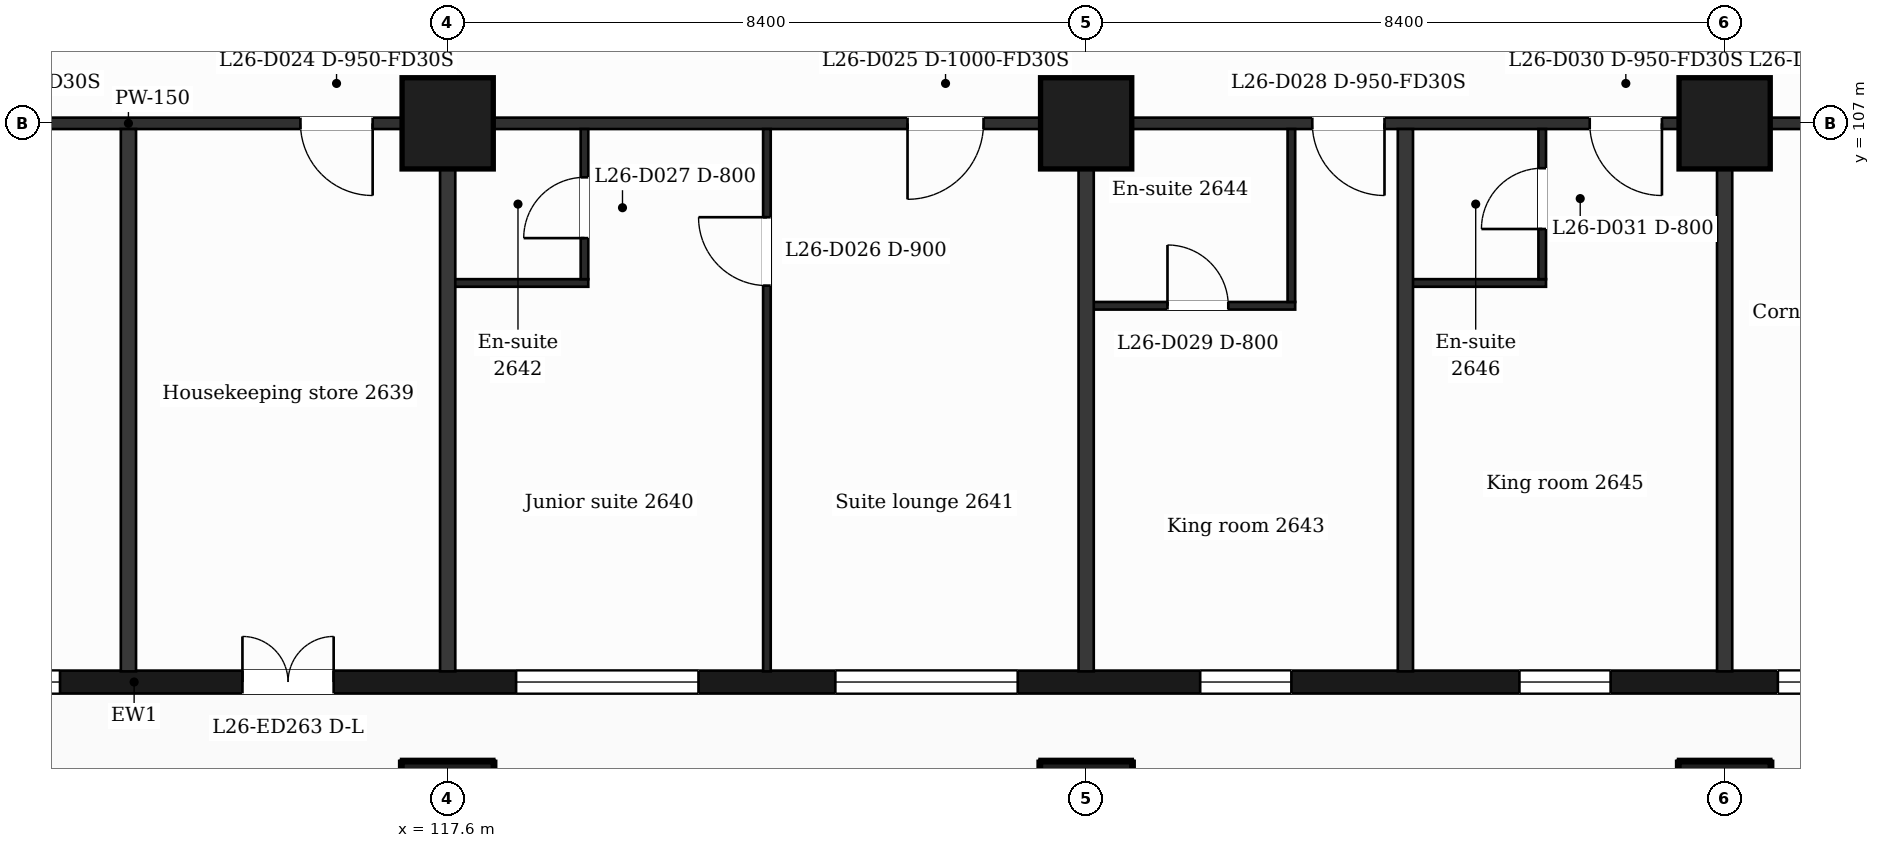
"""IFC4 building model, lengths in metres.
Left out: names, types, materials, properties, quantities, classifications, styles, units other than length and angle.
Written with IfcOpenShell. Run it as: python <this file> out.ifc"""

import sys

from ifc_helpers import new_model, si_unit, direction, frame, frame_2d, origin, origin_2d, place, context, subcontext, project, spatial, rectangle, extrude, element, fill, save


model = new_model("IFC4")
c1 = context("Model", 3, precision=1e-05, world=origin(), true_north=direction((0.0, 1.0)))
c2 = subcontext(c1, "Body", "Model", "MODEL_VIEW")
j1 = project(units=[si_unit("LENGTHUNIT", "METRE"), si_unit("PLANEANGLEUNIT", "RADIAN")], contexts=[c1])
p1 = place(None, origin())
s1 = spatial("IfcSite", under=j1, at=p1, CompositionType="ELEMENT")
p2 = place(p1, origin())
s2 = spatial("IfcBuilding", under=s1, at=p2, CompositionType="ELEMENT")
p3 = place(p2, frame((0.0, 0.0, 113.2)))
s3 = spatial("IfcBuildingStorey", under=s2, at=p3, CompositionType="ELEMENT", Elevation=113.2)
for number, where, z_axis, x_axis in (
    (1, (117.6, 98.0, 0.0), (0.0, 0.0, 1.0), (1.0, 0.0, 0.0)),
    (2, (126.0, 98.0, 0.0), (0.0, 0.0, 1.0), (1.0, 0.0, 0.0)),
    (3, (134.4, 98.0, 0.0), (0.0, 0.0, 1.0), (1.0, 0.0, 0.0)),
    (4, (117.6, 107.0, 0.0), (0.0, 0.0, 1.0), (1.0, 0.0, 0.0)),
    (5, (126.0, 107.0, 0.0), (0.0, 0.0, 1.0), (1.0, 0.0, 0.0)),
    (6, (134.4, 107.0, 0.0), (0.0, 0.0, 1.0), (1.0, 0.0, 0.0)),
):
    element("IfcColumn", number, at=place(p3, frame(where, z_axis=z_axis, x_axis=x_axis)), inside=s3, PredefinedType="COLUMN", context=c2, shape_type="SweptSolid", body=[
        extrude(rectangle(XDim=1.2, YDim=1.2, at=origin_2d()), origin(), (0.0, 0.0, 1.0), 3.7),
    ])
p4 = place(p3, frame((89.85, 99.65, 0.0), z_axis=(0.0, 0.0, 1.0), x_axis=(1.0, 0.0, 0.0)))
e7 = element("IfcWall", 7, at=p4, inside=s3, PredefinedType="SOLIDWALL", context=c2, shape_type="SweptSolid", body=[
    extrude(rectangle(XDim=47.25, YDim=0.3, at=frame_2d((23.625, 0.0))), origin(), (0.0, 0.0, 1.0), 3.38),
])
p5 = place(p4, frame((0.725, 0.0, 0.9)))
e8 = element("IfcOpeningElement", 8, at=p5, cuts=e7, PredefinedType="OPENING", context=c2, shape_type="SweptSolid", body=[
    extrude(rectangle(XDim=1.2, YDim=2.1, at=frame_2d((0.6, 1.05))), frame((0.0, 0.16, 0.0), z_axis=(0.0, -1.0, 0.0), x_axis=(1.0, 0.0, 0.0)), (0.0, 0.0, 1.0), 0.32),
])
p6 = place(p4, frame((3.45, 0.0, 0.9)))
e9 = element("IfcOpeningElement", 9, at=p6, cuts=e7, PredefinedType="OPENING", context=c2, shape_type="SweptSolid", body=[
    extrude(rectangle(XDim=2.4, YDim=2.1, at=frame_2d((1.2, 1.05))), frame((0.0, 0.16, 0.0), z_axis=(0.0, -1.0, 0.0), x_axis=(1.0, 0.0, 0.0)), (0.0, 0.0, 1.0), 0.32),
])
p7 = place(p4, frame((8.25, 0.0, 0.9)))
e10 = element("IfcOpeningElement", 10, at=p7, cuts=e7, PredefinedType="OPENING", context=c2, shape_type="SweptSolid", body=[
    extrude(rectangle(XDim=1.2, YDim=2.1, at=frame_2d((0.6, 1.05))), frame((0.0, 0.16, 0.0), z_axis=(0.0, -1.0, 0.0), x_axis=(1.0, 0.0, 0.0)), (0.0, 0.0, 1.0), 0.32),
])
p8 = place(p4, frame((12.45, 0.0, 0.9)))
e11 = element("IfcOpeningElement", 11, at=p8, cuts=e7, PredefinedType="OPENING", context=c2, shape_type="SweptSolid", body=[
    extrude(rectangle(XDim=1.2, YDim=2.1, at=frame_2d((0.6, 1.05))), frame((0.0, 0.16, 0.0), z_axis=(0.0, -1.0, 0.0), x_axis=(1.0, 0.0, 0.0)), (0.0, 0.0, 1.0), 0.32),
])
p9 = place(p4, frame((16.05, 0.0, 0.9)))
e12 = element("IfcOpeningElement", 12, at=p9, cuts=e7, PredefinedType="OPENING", context=c2, shape_type="SweptSolid", body=[
    extrude(rectangle(XDim=2.4, YDim=2.1, at=frame_2d((1.2, 1.05))), frame((0.0, 0.16, 0.0), z_axis=(0.0, -1.0, 0.0), x_axis=(1.0, 0.0, 0.0)), (0.0, 0.0, 1.0), 0.32),
])
p10 = place(p4, frame((20.25, 0.0, 0.9)))
e13 = element("IfcOpeningElement", 13, at=p10, cuts=e7, PredefinedType="OPENING", context=c2, shape_type="SweptSolid", body=[
    extrude(rectangle(XDim=2.4, YDim=2.1, at=frame_2d((1.2, 1.05))), frame((0.0, 0.16, 0.0), z_axis=(0.0, -1.0, 0.0), x_axis=(1.0, 0.0, 0.0)), (0.0, 0.0, 1.0), 0.32),
])
p11 = place(p4, frame((25.05, 0.0, 0.0)))
e14 = element("IfcOpeningElement", 14, at=p11, cuts=e7, PredefinedType="OPENING", context=c2, shape_type="SweptSolid", body=[
    extrude(rectangle(XDim=1.2, YDim=2.4, at=frame_2d((0.6, 1.2))), frame((0.0, 0.16, 0.0), z_axis=(0.0, -1.0, 0.0), x_axis=(1.0, 0.0, 0.0)), (0.0, 0.0, 1.0), 0.32),
])
p12 = place(p4, frame((28.65, 0.0, 0.9)))
e15 = element("IfcOpeningElement", 15, at=p12, cuts=e7, PredefinedType="OPENING", context=c2, shape_type="SweptSolid", body=[
    extrude(rectangle(XDim=2.4, YDim=2.1, at=frame_2d((1.2, 1.05))), frame((0.0, 0.16, 0.0), z_axis=(0.0, -1.0, 0.0), x_axis=(1.0, 0.0, 0.0)), (0.0, 0.0, 1.0), 0.32),
])
p13 = place(p4, frame((32.85, 0.0, 0.9)))
e16 = element("IfcOpeningElement", 16, at=p13, cuts=e7, PredefinedType="OPENING", context=c2, shape_type="SweptSolid", body=[
    extrude(rectangle(XDim=2.4, YDim=2.1, at=frame_2d((1.2, 1.05))), frame((0.0, 0.16, 0.0), z_axis=(0.0, -1.0, 0.0), x_axis=(1.0, 0.0, 0.0)), (0.0, 0.0, 1.0), 0.32),
])
p14 = place(p4, frame((37.65, 0.0, 0.9)))
e17 = element("IfcOpeningElement", 17, at=p14, cuts=e7, PredefinedType="OPENING", context=c2, shape_type="SweptSolid", body=[
    extrude(rectangle(XDim=1.2, YDim=2.1, at=frame_2d((0.6, 1.05))), frame((0.0, 0.16, 0.0), z_axis=(0.0, -1.0, 0.0), x_axis=(1.0, 0.0, 0.0)), (0.0, 0.0, 1.0), 0.32),
])
p15 = place(p4, frame((41.85, 0.0, 0.9)))
e18 = element("IfcOpeningElement", 18, at=p15, cuts=e7, PredefinedType="OPENING", context=c2, shape_type="SweptSolid", body=[
    extrude(rectangle(XDim=1.2, YDim=2.1, at=frame_2d((0.6, 1.05))), frame((0.0, 0.16, 0.0), z_axis=(0.0, -1.0, 0.0), x_axis=(1.0, 0.0, 0.0)), (0.0, 0.0, 1.0), 0.32),
])
p16 = place(p4, frame((45.25, 0.0, 0.9)))
e19 = element("IfcOpeningElement", 19, at=p16, cuts=e7, PredefinedType="OPENING", context=c2, shape_type="SweptSolid", body=[
    extrude(rectangle(XDim=1.2, YDim=2.1, at=frame_2d((0.6, 1.05))), frame((0.0, 0.16, 0.0), z_axis=(0.0, -1.0, 0.0), x_axis=(1.0, 0.0, 0.0)), (0.0, 0.0, 1.0), 0.32),
])
p17 = place(p3, frame((126.0, 104.6, 0.0), z_axis=(0.0, 0.0, 1.0), x_axis=(1.0, 0.0, 0.0)))
e20 = element("IfcWall", 20, at=p17, inside=s3, PredefinedType="PARTITIONING", context=c2, shape_type="SweptSolid", body=[
    extrude(rectangle(XDim=2.75, YDim=0.1, at=frame_2d((1.375, 0.0))), origin(), (0.0, 0.0, 1.0), 3.38),
])
p18 = place(p17, frame((1.07, 0.0, 0.0)))
e21 = element("IfcOpeningElement", 21, at=p18, cuts=e20, PredefinedType="OPENING", context=c2, shape_type="SweptSolid", body=[
    extrude(rectangle(XDim=0.8, YDim=2.1, at=frame_2d((0.4, 1.05))), frame((0.0, 0.06, 0.0), z_axis=(0.0, -1.0, 0.0), x_axis=(1.0, 0.0, 0.0)), (0.0, 0.0, 1.0), 0.12),
])
p19 = place(p3, frame((117.6, 104.9, 0.0), z_axis=(0.0, 0.0, 1.0), x_axis=(1.0, 0.0, 0.0)))
e22 = element("IfcWall", 22, at=p19, inside=s3, PredefinedType="PARTITIONING", context=c2, shape_type="SweptSolid", body=[
    extrude(rectangle(XDim=1.85, YDim=0.1, at=frame_2d((0.925, 0.0))), origin(), (0.0, 0.0, 1.0), 3.38),
])
p20 = place(p3, frame((130.2, 104.9, 0.0), z_axis=(0.0, 0.0, 1.0), x_axis=(1.0, 0.0, 0.0)))
e23 = element("IfcWall", 23, at=p20, inside=s3, PredefinedType="PARTITIONING", context=c2, shape_type="SweptSolid", body=[
    extrude(rectangle(XDim=1.85, YDim=0.1, at=frame_2d((0.925, 0.0))), origin(), (0.0, 0.0, 1.0), 3.38),
])
p21 = place(p3, frame((87.018, 107.0, 0.0), z_axis=(0.0, 0.0, 1.0), x_axis=(1.0, 0.0, 0.0)))
e24 = element("IfcWall", 24, at=p21, inside=s3, PredefinedType="PARTITIONING", context=c2, shape_type="SweptSolid", body=[
    extrude(rectangle(XDim=52.765, YDim=0.15, at=frame_2d((26.382, 0.0))), origin(), (0.0, 0.0, 1.0), 3.38),
])
p22 = place(p21, frame((1.032, 0.0, 0.0)))
e25 = element("IfcOpeningElement", 25, at=p22, cuts=e24, PredefinedType="OPENING", context=c2, shape_type="SweptSolid", body=[
    extrude(rectangle(XDim=0.95, YDim=2.1, at=frame_2d((0.475, 1.05))), frame((0.0, 0.085, 0.0), z_axis=(0.0, -1.0, 0.0), x_axis=(1.0, 0.0, 0.0)), (0.0, 0.0, 1.0), 0.17),
])
p23 = place(p21, frame((9.752, 0.0, 0.0)))
e26 = element("IfcOpeningElement", 26, at=p23, cuts=e24, PredefinedType="OPENING", context=c2, shape_type="SweptSolid", body=[
    extrude(rectangle(XDim=1.0, YDim=2.1, at=frame_2d((0.5, 1.05))), frame((0.0, 0.085, 0.0), z_axis=(0.0, -1.0, 0.0), x_axis=(1.0, 0.0, 0.0)), (0.0, 0.0, 1.0), 0.17),
])
p24 = place(p21, frame((23.995, 0.0, 0.0)))
e27 = element("IfcOpeningElement", 27, at=p24, cuts=e24, PredefinedType="OPENING", context=c2, shape_type="SweptSolid", body=[
    extrude(rectangle(XDim=0.95, YDim=2.1, at=frame_2d((0.475, 1.05))), frame((0.0, 0.085, 0.0), z_axis=(0.0, -1.0, 0.0), x_axis=(1.0, 0.0, 0.0)), (0.0, 0.0, 1.0), 0.17),
])
p25 = place(p21, frame((28.645, 0.0, 0.0)))
e28 = element("IfcOpeningElement", 28, at=p25, cuts=e24, PredefinedType="OPENING", context=c2, shape_type="SweptSolid", body=[
    extrude(rectangle(XDim=0.95, YDim=2.1, at=frame_2d((0.475, 1.05))), frame((0.0, 0.085, 0.0), z_axis=(0.0, -1.0, 0.0), x_axis=(1.0, 0.0, 0.0)), (0.0, 0.0, 1.0), 0.17),
])
p26 = place(p21, frame((36.632, 0.0, 0.0)))
e29 = element("IfcOpeningElement", 29, at=p26, cuts=e24, PredefinedType="OPENING", context=c2, shape_type="SweptSolid", body=[
    extrude(rectangle(XDim=1.0, YDim=2.1, at=frame_2d((0.5, 1.05))), frame((0.0, 0.085, 0.0), z_axis=(0.0, -1.0, 0.0), x_axis=(1.0, 0.0, 0.0)), (0.0, 0.0, 1.0), 0.17),
])
p27 = place(p21, frame((41.957, 0.0, 0.0)))
e30 = element("IfcOpeningElement", 30, at=p27, cuts=e24, PredefinedType="OPENING", context=c2, shape_type="SweptSolid", body=[
    extrude(rectangle(XDim=0.95, YDim=2.1, at=frame_2d((0.475, 1.05))), frame((0.0, 0.085, 0.0), z_axis=(0.0, -1.0, 0.0), x_axis=(1.0, 0.0, 0.0)), (0.0, 0.0, 1.0), 0.17),
])
p28 = place(p21, frame((45.607, 0.0, 0.0)))
e31 = element("IfcOpeningElement", 31, at=p28, cuts=e24, PredefinedType="OPENING", context=c2, shape_type="SweptSolid", body=[
    extrude(rectangle(XDim=0.95, YDim=2.1, at=frame_2d((0.475, 1.05))), frame((0.0, 0.085, 0.0), z_axis=(0.0, -1.0, 0.0), x_axis=(1.0, 0.0, 0.0)), (0.0, 0.0, 1.0), 0.17),
])
p29 = place(p21, frame((48.767, 0.0, 0.0)))
e32 = element("IfcOpeningElement", 32, at=p29, cuts=e24, PredefinedType="OPENING", context=c2, shape_type="SweptSolid", body=[
    extrude(rectangle(XDim=0.95, YDim=2.1, at=frame_2d((0.475, 1.05))), frame((0.0, 0.085, 0.0), z_axis=(0.0, -1.0, 0.0), x_axis=(1.0, 0.0, 0.0)), (0.0, 0.0, 1.0), 0.17),
])
for number, where, z_axis, x_axis in (
    (33, (113.4, 99.79, 0.0), (0.0, 0.0, 1.0), (0.0, 1.0, 0.0)),
    (34, (117.6, 99.79, 0.0), (0.0, 0.0, 1.0), (0.0, 1.0, 0.0)),
):
    element("IfcWall", number, at=place(p3, frame(where, z_axis=z_axis, x_axis=x_axis)), inside=s3, PredefinedType="PARTITIONING", context=c2, shape_type="SweptSolid", body=[
        extrude(rectangle(XDim=7.135, YDim=0.2, at=frame_2d((3.567, 0.0))), origin(), (0.0, 0.0, 1.0), 3.38),
    ])
p30 = place(p3, frame((119.4, 104.95, 0.0), z_axis=(0.0, 0.0, 1.0), x_axis=(0.0, 1.0, 0.0)))
e35 = element("IfcWall", 35, at=p30, inside=s3, PredefinedType="PARTITIONING", context=c2, shape_type="SweptSolid", body=[
    extrude(rectangle(XDim=1.975, YDim=0.1, at=frame_2d((0.988, 0.0))), origin(), (0.0, 0.0, 1.0), 3.38),
])
p31 = place(p30, frame((0.54, 0.0, 0.0)))
e36 = element("IfcOpeningElement", 36, at=p31, cuts=e35, PredefinedType="OPENING", context=c2, shape_type="SweptSolid", body=[
    extrude(rectangle(XDim=0.8, YDim=2.1, at=frame_2d((0.4, 1.05))), frame((0.0, 0.06, 0.0), z_axis=(0.0, -1.0, 0.0), x_axis=(1.0, 0.0, 0.0)), (0.0, 0.0, 1.0), 0.12),
])
p32 = place(p3, frame((121.8, 99.79, 0.0), z_axis=(0.0, 0.0, 1.0), x_axis=(0.0, 1.0, 0.0)))
e37 = element("IfcWall", 37, at=p32, inside=s3, PredefinedType="PARTITIONING", context=c2, shape_type="SweptSolid", body=[
    extrude(rectangle(XDim=7.135, YDim=0.1, at=frame_2d((3.567, 0.0))), origin(), (0.0, 0.0, 1.0), 3.38),
])
p33 = place(p32, frame((5.075, 0.0, 0.0)))
e38 = element("IfcOpeningElement", 38, at=p33, cuts=e37, PredefinedType="OPENING", context=c2, shape_type="SweptSolid", body=[
    extrude(rectangle(XDim=0.9, YDim=2.1, at=frame_2d((0.45, 1.05))), frame((0.0, 0.06, 0.0), z_axis=(0.0, -1.0, 0.0), x_axis=(1.0, 0.0, 0.0)), (0.0, 0.0, 1.0), 0.12),
])
p34 = place(p3, frame((126.0, 99.79, 0.0), z_axis=(0.0, 0.0, 1.0), x_axis=(0.0, 1.0, 0.0)))
e39 = element("IfcWall", 39, at=p34, inside=s3, PredefinedType="PARTITIONING", context=c2, shape_type="SweptSolid", body=[
    extrude(rectangle(XDim=7.135, YDim=0.2, at=frame_2d((3.567, 0.0))), origin(), (0.0, 0.0, 1.0), 3.38),
])
p35 = place(p3, frame((128.7, 104.65, 0.0), z_axis=(0.0, 0.0, 1.0), x_axis=(0.0, 1.0, 0.0)))
e40 = element("IfcWall", 40, at=p35, inside=s3, PredefinedType="PARTITIONING", context=c2, shape_type="SweptSolid", body=[
    extrude(rectangle(XDim=2.275, YDim=0.1, at=frame_2d((1.138, 0.0))), origin(), (0.0, 0.0, 1.0), 3.38),
])
p36 = place(p3, frame((130.2, 99.79, 0.0), z_axis=(0.0, 0.0, 1.0), x_axis=(0.0, 1.0, 0.0)))
e41 = element("IfcWall", 41, at=p36, inside=s3, PredefinedType="PARTITIONING", context=c2, shape_type="SweptSolid", body=[
    extrude(rectangle(XDim=7.135, YDim=0.2, at=frame_2d((3.567, 0.0))), origin(), (0.0, 0.0, 1.0), 3.38),
])
p37 = place(p3, frame((132.0, 104.95, 0.0), z_axis=(0.0, 0.0, 1.0), x_axis=(0.0, 1.0, 0.0)))
e42 = element("IfcWall", 42, at=p37, inside=s3, PredefinedType="PARTITIONING", context=c2, shape_type="SweptSolid", body=[
    extrude(rectangle(XDim=1.975, YDim=0.1, at=frame_2d((0.988, 0.0))), origin(), (0.0, 0.0, 1.0), 3.38),
])
p38 = place(p37, frame((0.66, 0.0, 0.0)))
e43 = element("IfcOpeningElement", 43, at=p38, cuts=e42, PredefinedType="OPENING", context=c2, shape_type="SweptSolid", body=[
    extrude(rectangle(XDim=0.8, YDim=2.1, at=frame_2d((0.4, 1.05))), frame((0.0, 0.06, 0.0), z_axis=(0.0, -1.0, 0.0), x_axis=(1.0, 0.0, 0.0)), (0.0, 0.0, 1.0), 0.12),
])
p39 = place(p3, frame((134.4, 99.79, 0.0), z_axis=(0.0, 0.0, 1.0), x_axis=(0.0, 1.0, 0.0)))
e44 = element("IfcWall", 44, at=p39, inside=s3, PredefinedType="PARTITIONING", context=c2, shape_type="SweptSolid", body=[
    extrude(rectangle(XDim=7.135, YDim=0.2, at=frame_2d((3.567, 0.0))), origin(), (0.0, 0.0, 1.0), 3.38),
])
p40 = place(p10, origin())
e45 = element("IfcWindow", 45, at=p40, inside=s3, PartitioningType="SINGLE_PANEL", PredefinedType="WINDOW", context=c2, shape_type="SweptSolid", body=[
    extrude(rectangle(XDim=2.4, YDim=2.1, at=frame_2d((1.2, 1.05))), frame((0.0, 0.03, 0.0), z_axis=(0.0, -1.0, 0.0), x_axis=(1.0, 0.0, 0.0)), (0.0, 0.0, 1.0), 0.06),
])
fill(e13, e45)
p41 = place(p11, origin())
e46 = element("IfcDoor", 46, at=p41, inside=s3, OperationType="DOUBLE_DOOR_SINGLE_SWING", PredefinedType="DOOR", context=c2, shape_type="SweptSolid", body=[
    extrude(rectangle(XDim=1.2, YDim=2.4, at=frame_2d((0.6, 1.2))), frame((0.0, 0.025, 0.0), z_axis=(0.0, -1.0, 0.0), x_axis=(1.0, 0.0, 0.0)), (0.0, 0.0, 1.0), 0.05),
])
fill(e14, e46)
p42 = place(p12, origin())
e47 = element("IfcWindow", 47, at=p42, inside=s3, PartitioningType="SINGLE_PANEL", PredefinedType="WINDOW", context=c2, shape_type="SweptSolid", body=[
    extrude(rectangle(XDim=2.4, YDim=2.1, at=frame_2d((1.2, 1.05))), frame((0.0, 0.03, 0.0), z_axis=(0.0, -1.0, 0.0), x_axis=(1.0, 0.0, 0.0)), (0.0, 0.0, 1.0), 0.06),
])
fill(e15, e47)
p43 = place(p13, origin())
e48 = element("IfcWindow", 48, at=p43, inside=s3, PartitioningType="SINGLE_PANEL", PredefinedType="WINDOW", context=c2, shape_type="SweptSolid", body=[
    extrude(rectangle(XDim=2.4, YDim=2.1, at=frame_2d((1.2, 1.05))), frame((0.0, 0.03, 0.0), z_axis=(0.0, -1.0, 0.0), x_axis=(1.0, 0.0, 0.0)), (0.0, 0.0, 1.0), 0.06),
])
fill(e16, e48)
p44 = place(p14, origin())
e49 = element("IfcWindow", 49, at=p44, inside=s3, PartitioningType="SINGLE_PANEL", PredefinedType="WINDOW", context=c2, shape_type="SweptSolid", body=[
    extrude(rectangle(XDim=1.2, YDim=2.1, at=frame_2d((0.6, 1.05))), frame((0.0, 0.03, 0.0), z_axis=(0.0, -1.0, 0.0), x_axis=(1.0, 0.0, 0.0)), (0.0, 0.0, 1.0), 0.06),
])
fill(e17, e49)
p45 = place(p15, origin())
e50 = element("IfcWindow", 50, at=p45, inside=s3, PartitioningType="SINGLE_PANEL", PredefinedType="WINDOW", context=c2, shape_type="SweptSolid", body=[
    extrude(rectangle(XDim=1.2, YDim=2.1, at=frame_2d((0.6, 1.05))), frame((0.0, 0.03, 0.0), z_axis=(0.0, -1.0, 0.0), x_axis=(1.0, 0.0, 0.0)), (0.0, 0.0, 1.0), 0.06),
])
fill(e18, e50)
p46 = place(p16, origin())
e51 = element("IfcWindow", 51, at=p46, inside=s3, PartitioningType="SINGLE_PANEL", PredefinedType="WINDOW", context=c2, shape_type="SweptSolid", body=[
    extrude(rectangle(XDim=1.2, YDim=2.1, at=frame_2d((0.6, 1.05))), frame((0.0, 0.03, 0.0), z_axis=(0.0, -1.0, 0.0), x_axis=(1.0, 0.0, 0.0)), (0.0, 0.0, 1.0), 0.06),
])
fill(e19, e51)
p47 = place(p25, origin())
e52 = element("IfcDoor", 52, at=p47, inside=s3, OperationType="SINGLE_SWING_RIGHT", PredefinedType="DOOR", context=c2, shape_type="SweptSolid", body=[
    extrude(rectangle(XDim=0.95, YDim=2.1, at=frame_2d((0.475, 1.05))), frame((0.0, 0.025, 0.0), z_axis=(0.0, -1.0, 0.0), x_axis=(1.0, 0.0, 0.0)), (0.0, 0.0, 1.0), 0.05),
])
fill(e28, e52)
p48 = place(p26, origin())
e53 = element("IfcDoor", 53, at=p48, inside=s3, OperationType="SINGLE_SWING_LEFT", PredefinedType="DOOR", context=c2, shape_type="SweptSolid", body=[
    extrude(rectangle(XDim=1.0, YDim=2.1, at=frame_2d((0.5, 1.05))), frame((0.0, 0.025, 0.0), z_axis=(0.0, -1.0, 0.0), x_axis=(1.0, 0.0, 0.0)), (0.0, 0.0, 1.0), 0.05),
])
fill(e29, e53)
p49 = place(p33, origin())
e54 = element("IfcDoor", 54, at=p49, inside=s3, OperationType="SINGLE_SWING_RIGHT", PredefinedType="DOOR", context=c2, shape_type="SweptSolid", body=[
    extrude(rectangle(XDim=0.9, YDim=2.1, at=frame_2d((0.45, 1.05))), frame((0.0, 0.025, 0.0), z_axis=(0.0, -1.0, 0.0), x_axis=(1.0, 0.0, 0.0)), (0.0, 0.0, 1.0), 0.05),
])
fill(e38, e54)
p50 = place(p31, origin())
e55 = element("IfcDoor", 55, at=p50, inside=s3, OperationType="SINGLE_SWING_LEFT", PredefinedType="DOOR", context=c2, shape_type="SweptSolid", body=[
    extrude(rectangle(XDim=0.8, YDim=2.1, at=frame_2d((0.4, 1.05))), frame((0.0, 0.025, 0.0), z_axis=(0.0, -1.0, 0.0), x_axis=(1.0, 0.0, 0.0)), (0.0, 0.0, 1.0), 0.05),
])
fill(e36, e55)
p51 = place(p27, origin())
e56 = element("IfcDoor", 56, at=p51, inside=s3, OperationType="SINGLE_SWING_RIGHT", PredefinedType="DOOR", context=c2, shape_type="SweptSolid", body=[
    extrude(rectangle(XDim=0.95, YDim=2.1, at=frame_2d((0.475, 1.05))), frame((0.0, 0.025, 0.0), z_axis=(0.0, -1.0, 0.0), x_axis=(1.0, 0.0, 0.0)), (0.0, 0.0, 1.0), 0.05),
])
fill(e30, e56)
p52 = place(p18, origin())
e57 = element("IfcDoor", 57, at=p52, inside=s3, OperationType="SINGLE_SWING_LEFT", PredefinedType="DOOR", context=c2, shape_type="SweptSolid", body=[
    extrude(rectangle(XDim=0.8, YDim=2.1, at=frame_2d((0.4, 1.05))), frame((0.0, 0.025, 0.0), z_axis=(0.0, -1.0, 0.0), x_axis=(1.0, 0.0, 0.0)), (0.0, 0.0, 1.0), 0.05),
])
fill(e21, e57)
p53 = place(p28, origin())
e58 = element("IfcDoor", 58, at=p53, inside=s3, OperationType="SINGLE_SWING_RIGHT", PredefinedType="DOOR", context=c2, shape_type="SweptSolid", body=[
    extrude(rectangle(XDim=0.95, YDim=2.1, at=frame_2d((0.475, 1.05))), frame((0.0, 0.025, 0.0), z_axis=(0.0, -1.0, 0.0), x_axis=(1.0, 0.0, 0.0)), (0.0, 0.0, 1.0), 0.05),
])
fill(e31, e58)
p54 = place(p38, origin())
e59 = element("IfcDoor", 59, at=p54, inside=s3, OperationType="SINGLE_SWING_LEFT", PredefinedType="DOOR", context=c2, shape_type="SweptSolid", body=[
    extrude(rectangle(XDim=0.8, YDim=2.1, at=frame_2d((0.4, 1.05))), frame((0.0, 0.025, 0.0), z_axis=(0.0, -1.0, 0.0), x_axis=(1.0, 0.0, 0.0)), (0.0, 0.0, 1.0), 0.05),
])
fill(e43, e59)
save(model, sys.argv[1])
